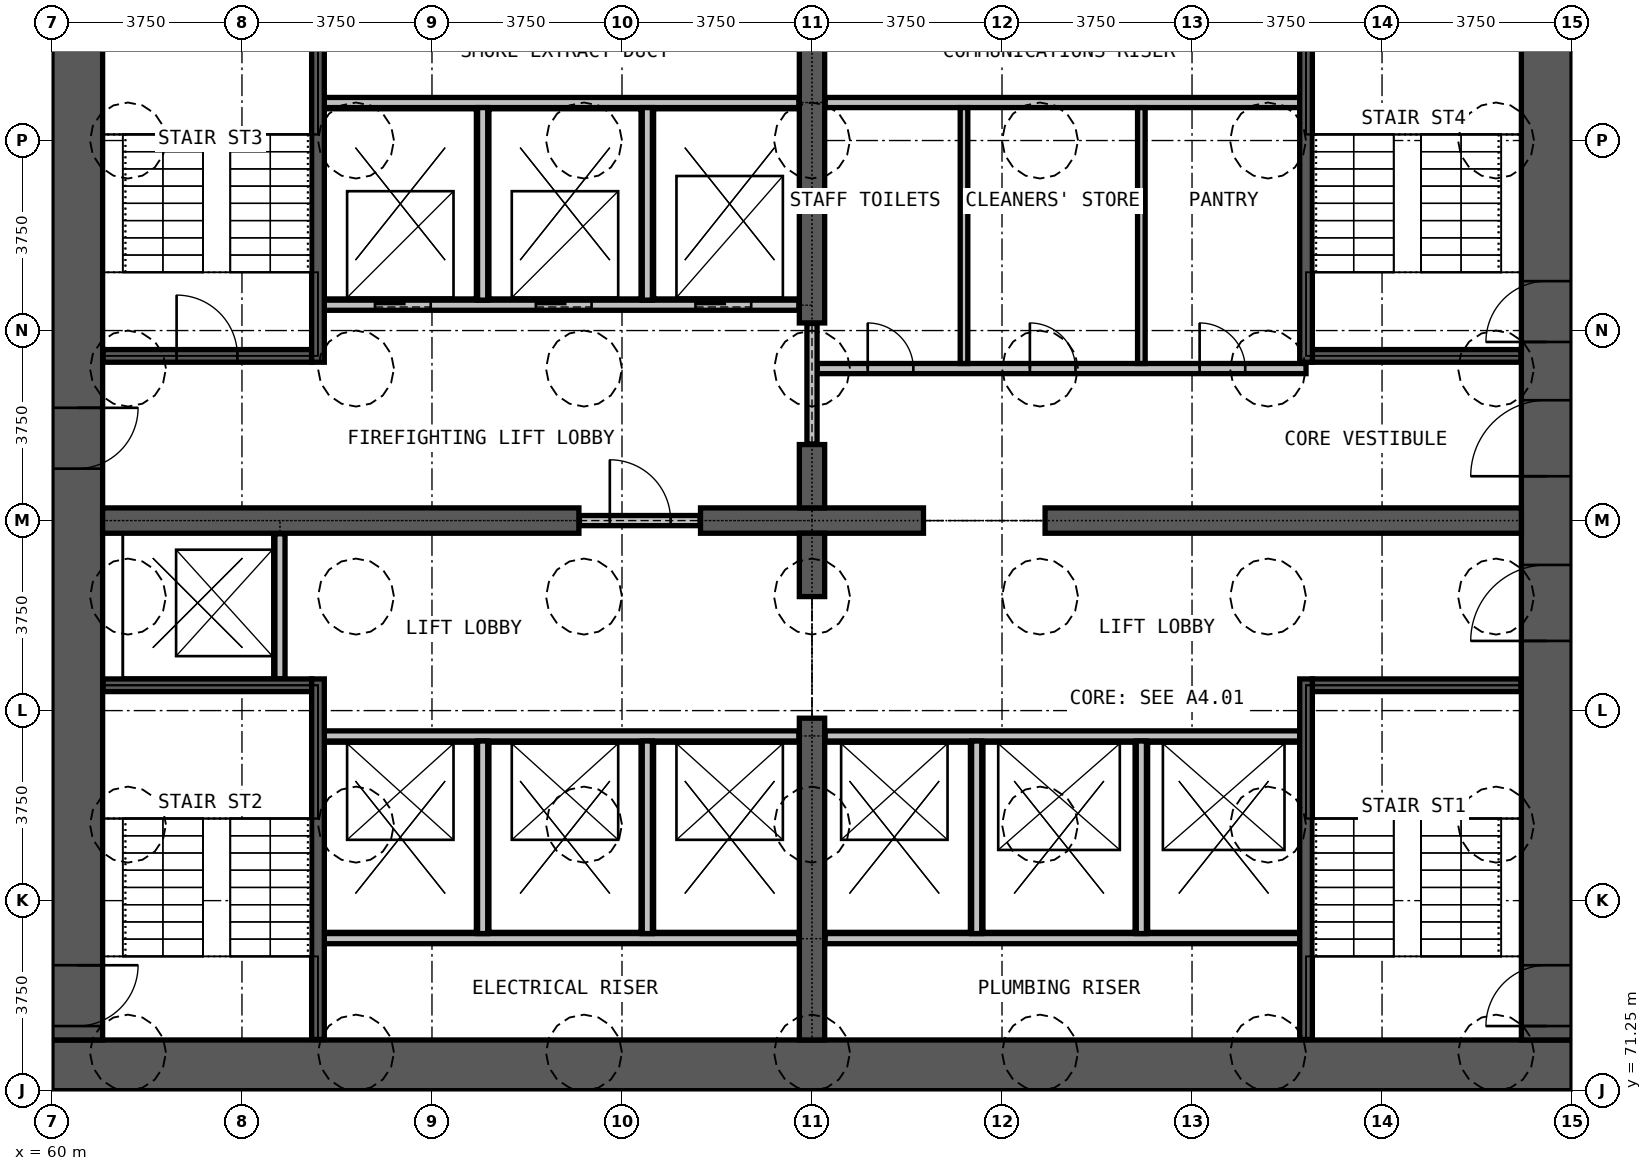
"""IFC4 building model, lengths in metres.
Left out: names, types, materials, properties, quantities, classifications, styles, units other than length and angle.
Written with IfcOpenShell. Run it as: python <this file> out.ifc"""

import sys

from ifc_helpers import new_model, si_unit, direction, frame, frame_2d, origin, place, context, subcontext, project, spatial, rectangle, extrude, element, fill, save


model = new_model("IFC4")
c1 = context("Model", 3, precision=1e-05, world=origin(), true_north=direction((0.0, 1.0)))
c2 = subcontext(c1, "Body", "Model", "MODEL_VIEW")
j1 = project(units=[si_unit("LENGTHUNIT", "METRE"), si_unit("PLANEANGLEUNIT", "RADIAN")], contexts=[c1])
p1 = place(None, origin())
s1 = spatial("IfcSite", under=j1, at=p1, CompositionType="ELEMENT")
p2 = place(p1, origin())
s2 = spatial("IfcBuilding", under=s1, at=p2, CompositionType="ELEMENT")
p3 = place(p2, frame((0.0, 0.0, -6.0)))
s3 = spatial("IfcBuildingStorey", under=s2, at=p3, CompositionType="ELEMENT", Elevation=-6.0)
p4 = place(p3, frame((60.0, 71.75, 0.0), z_axis=(0.0, 0.0, 1.0), x_axis=(1.0, 0.0, 0.0)))
e1 = element("IfcWall", 1, at=p4, inside=s3, PredefinedType="SHEAR", context=c2, shape_type="SweptSolid", body=[
    extrude(rectangle(XDim=30.0, YDim=1.0, at=frame_2d((15.0, 0.0))), origin(), (0.0, 0.0, 1.0), 6.0),
])
p5 = place(p3, frame((89.5, 72.25, 0.0), z_axis=(0.0, 0.0, 1.0), x_axis=(0.0, 1.0, 0.0)))
e2 = element("IfcWall", 2, at=p5, inside=s3, PredefinedType="SHEAR", context=c2, shape_type="SweptSolid", body=[
    extrude(rectangle(XDim=20.5, YDim=1.0, at=frame_2d((10.25, 0.0))), origin(), (0.0, 0.0, 1.0), 6.0),
])
p6 = place(p5, frame((0.275, 0.0, 0.0)))
e3 = element("IfcOpeningElement", 3, at=p6, cuts=e2, PredefinedType="OPENING", context=c2, shape_type="SweptSolid", body=[
    extrude(rectangle(XDim=1.2, YDim=2.2, at=frame_2d((0.6, 1.1))), frame((0.0, 0.51, 0.0), z_axis=(0.0, -1.0, 0.0), x_axis=(1.0, 0.0, 0.0)), (0.0, 0.0, 1.0), 1.02),
])
p7 = place(p5, frame((13.775, 0.0, 0.0)))
e4 = element("IfcOpeningElement", 4, at=p7, cuts=e2, PredefinedType="OPENING", context=c2, shape_type="SweptSolid", body=[
    extrude(rectangle(XDim=1.2, YDim=2.2, at=frame_2d((0.6, 1.1))), frame((0.0, 0.51, 0.0), z_axis=(0.0, -1.0, 0.0), x_axis=(1.0, 0.0, 0.0)), (0.0, 0.0, 1.0), 1.02),
])
p8 = place(p5, frame((7.875, 0.0, 0.0)))
e5 = element("IfcOpeningElement", 5, at=p8, cuts=e2, PredefinedType="OPENING", context=c2, shape_type="SweptSolid", body=[
    extrude(rectangle(XDim=1.5, YDim=2.2, at=frame_2d((0.75, 1.1))), frame((0.0, 0.51, 0.0), z_axis=(0.0, -1.0, 0.0), x_axis=(1.0, 0.0, 0.0)), (0.0, 0.0, 1.0), 1.02),
])
p9 = place(p5, frame((11.125, 0.0, 0.0)))
e6 = element("IfcOpeningElement", 6, at=p9, cuts=e2, PredefinedType="OPENING", context=c2, shape_type="SweptSolid", body=[
    extrude(rectangle(XDim=1.5, YDim=2.2, at=frame_2d((0.75, 1.1))), frame((0.0, 0.51, 0.0), z_axis=(0.0, -1.0, 0.0), x_axis=(1.0, 0.0, 0.0)), (0.0, 0.0, 1.0), 1.02),
])
p10 = place(p3, frame((60.5, 92.75, 0.0), z_axis=(0.0, 0.0, 1.0), x_axis=(0.0, -1.0, 0.0)))
e7 = element("IfcWall", 7, at=p10, inside=s3, PredefinedType="SHEAR", context=c2, shape_type="SweptSolid", body=[
    extrude(rectangle(XDim=20.5, YDim=1.0, at=frame_2d((10.25, 0.0))), origin(), (0.0, 0.0, 1.0), 6.0),
])
p11 = place(p10, frame((19.025, 0.0, 0.0)))
e8 = element("IfcOpeningElement", 8, at=p11, cuts=e7, PredefinedType="OPENING", context=c2, shape_type="SweptSolid", body=[
    extrude(rectangle(XDim=1.2, YDim=2.2, at=frame_2d((0.6, 1.1))), frame((0.0, 0.51, 0.0), z_axis=(0.0, -1.0, 0.0), x_axis=(1.0, 0.0, 0.0)), (0.0, 0.0, 1.0), 1.02),
])
p12 = place(p10, frame((8.025, 0.0, 0.0)))
e9 = element("IfcOpeningElement", 9, at=p12, cuts=e7, PredefinedType="OPENING", context=c2, shape_type="SweptSolid", body=[
    extrude(rectangle(XDim=1.2, YDim=2.2, at=frame_2d((0.6, 1.1))), frame((0.0, 0.51, 0.0), z_axis=(0.0, -1.0, 0.0), x_axis=(1.0, 0.0, 0.0)), (0.0, 0.0, 1.0), 1.02),
])
p13 = place(p3, frame((61.0, 82.5, 0.0), z_axis=(0.0, 0.0, 1.0), x_axis=(1.0, 0.0, 0.0)))
e10 = element("IfcWall", 10, at=p13, inside=s3, PredefinedType="SHEAR", context=c2, shape_type="SweptSolid", body=[
    extrude(rectangle(XDim=9.4, YDim=0.5, at=frame_2d((4.7, 0.0))), origin(), (0.0, 0.0, 1.0), 6.0),
])
p14 = place(p3, frame((72.8, 82.5, 0.0), z_axis=(0.0, 0.0, 1.0), x_axis=(1.0, 0.0, 0.0)))
e11 = element("IfcWall", 11, at=p14, inside=s3, PredefinedType="SHEAR", context=c2, shape_type="SweptSolid", body=[
    extrude(rectangle(XDim=4.4, YDim=0.5, at=frame_2d((2.2, 0.0))), origin(), (0.0, 0.0, 1.0), 6.0),
])
p15 = place(p3, frame((79.6, 82.5, 0.0), z_axis=(0.0, 0.0, 1.0), x_axis=(1.0, 0.0, 0.0)))
e12 = element("IfcWall", 12, at=p15, inside=s3, PredefinedType="SHEAR", context=c2, shape_type="SweptSolid", body=[
    extrude(rectangle(XDim=9.4, YDim=0.5, at=frame_2d((4.7, 0.0))), origin(), (0.0, 0.0, 1.0), 6.0),
])
p16 = place(p3, frame((75.0, 72.25, 0.0), z_axis=(0.0, 0.0, 1.0), x_axis=(0.0, 1.0, 0.0)))
e13 = element("IfcWall", 13, at=p16, inside=s3, PredefinedType="SHEAR", context=c2, shape_type="SweptSolid", body=[
    extrude(rectangle(XDim=6.35, YDim=0.5, at=frame_2d((3.175, 0.0))), origin(), (0.0, 0.0, 1.0), 6.0),
])
for number, where, z_axis, x_axis in (
    (14, (75.0, 81.0, 0.0), (0.0, 0.0, 1.0), (0.0, 1.0, 0.0)),
    (15, (75.0, 82.75, 0.0), (0.0, 0.0, 1.0), (0.0, 1.0, 0.0)),
):
    element("IfcWall", number, at=place(p3, frame(where, z_axis=z_axis, x_axis=x_axis)), inside=s3, PredefinedType="SHEAR", context=c2, shape_type="SweptSolid", body=[
        extrude(rectangle(XDim=1.25, YDim=0.5, at=frame_2d((0.625, 0.0))), origin(), (0.0, 0.0, 1.0), 6.0),
    ])
p17 = place(p3, frame((75.0, 86.4, 0.0), z_axis=(0.0, 0.0, 1.0), x_axis=(0.0, 1.0, 0.0)))
e16 = element("IfcWall", 16, at=p17, inside=s3, PredefinedType="SHEAR", context=c2, shape_type="SweptSolid", body=[
    extrude(rectangle(XDim=6.35, YDim=0.5, at=frame_2d((3.175, 0.0))), origin(), (0.0, 0.0, 1.0), 6.0),
])
p18 = place(p3, frame((70.41, 82.5, 0.0), z_axis=(0.0, 0.0, 1.0), x_axis=(1.0, 0.0, 0.0)))
e17 = element("IfcWall", 17, at=p18, inside=s3, PredefinedType="PARTITIONING", context=c2, shape_type="SweptSolid", body=[
    extrude(rectangle(XDim=2.38, YDim=0.2, at=frame_2d((1.19, 0.0))), origin(), (0.0, 0.0, 1.0), 2.4),
])
p19 = place(p18, frame((0.6, 0.0, 0.0)))
e18 = element("IfcOpeningElement", 18, at=p19, cuts=e17, PredefinedType="OPENING", context=c2, shape_type="SweptSolid", body=[
    extrude(rectangle(XDim=1.2, YDim=2.2, at=frame_2d((0.6, 1.1))), frame((0.0, 0.11, 0.0), z_axis=(0.0, -1.0, 0.0), x_axis=(1.0, 0.0, 0.0)), (0.0, 0.0, 1.0), 0.22),
])
p20 = place(p3, frame((75.1, 85.5, 0.0), z_axis=(0.0, 0.0, 1.0), x_axis=(1.0, 0.0, 0.0)))
e19 = element("IfcWall", 19, at=p20, inside=s3, PredefinedType="PARTITIONING", context=c2, shape_type="SweptSolid", body=[
    extrude(rectangle(XDim=9.65, YDim=0.2, at=frame_2d((4.825, 0.0))), origin(), (0.0, 0.0, 1.0), 5.65),
])
p21 = place(p20, frame((1.0, 0.0, 0.0)))
e20 = element("IfcOpeningElement", 20, at=p21, cuts=e19, PredefinedType="OPENING", context=c2, shape_type="SweptSolid", body=[
    extrude(rectangle(XDim=0.9, YDim=2.2, at=frame_2d((0.45, 1.1))), frame((0.0, 0.11, 0.0), z_axis=(0.0, -1.0, 0.0), x_axis=(1.0, 0.0, 0.0)), (0.0, 0.0, 1.0), 0.22),
])
p22 = place(p20, frame((4.2, 0.0, 0.0)))
e21 = element("IfcOpeningElement", 21, at=p22, cuts=e19, PredefinedType="OPENING", context=c2, shape_type="SweptSolid", body=[
    extrude(rectangle(XDim=0.9, YDim=2.2, at=frame_2d((0.45, 1.1))), frame((0.0, 0.11, 0.0), z_axis=(0.0, -1.0, 0.0), x_axis=(1.0, 0.0, 0.0)), (0.0, 0.0, 1.0), 0.22),
])
p23 = place(p20, frame((7.55, 0.0, 0.0)))
e22 = element("IfcOpeningElement", 22, at=p23, cuts=e19, PredefinedType="OPENING", context=c2, shape_type="SweptSolid", body=[
    extrude(rectangle(XDim=0.9, YDim=2.2, at=frame_2d((0.45, 1.1))), frame((0.0, 0.11, 0.0), z_axis=(0.0, -1.0, 0.0), x_axis=(1.0, 0.0, 0.0)), (0.0, 0.0, 1.0), 0.22),
])
p24 = place(p3, frame((75.26, 90.75, 0.0), z_axis=(0.0, 0.0, 1.0), x_axis=(1.0, 0.0, 0.0)))
e23 = element("IfcWall", 23, at=p24, inside=s3, PredefinedType="PARTITIONING", context=c2, shape_type="SweptSolid", body=[
    extrude(rectangle(XDim=9.365, YDim=0.2, at=frame_2d((4.683, 0.0))), origin(), (0.0, 0.0, 1.0), 5.65),
])
p25 = place(p3, frame((75.0, 84.01, 0.0), z_axis=(0.0, 0.0, 1.0), x_axis=(0.0, 1.0, 0.0)))
e24 = element("IfcWall", 24, at=p25, inside=s3, PredefinedType="PARTITIONING", context=c2, shape_type="SweptSolid", body=[
    extrude(rectangle(XDim=2.38, YDim=0.2, at=frame_2d((1.19, 0.0))), origin(), (0.0, 0.0, 1.0), 2.4),
])
for number, where, z_axis, x_axis in (
    (25, (78.0, 85.6, 0.0), (0.0, 0.0, 1.0), (0.0, 1.0, 0.0)),
    (26, (81.5, 85.6, 0.0), (0.0, 0.0, 1.0), (0.0, 1.0, 0.0)),
):
    element("IfcWall", number, at=place(p3, frame(where, z_axis=z_axis, x_axis=x_axis)), inside=s3, PredefinedType="PARTITIONING", context=c2, shape_type="SweptSolid", body=[
        extrude(rectangle(XDim=5.05, YDim=0.15, at=frame_2d((2.525, 0.0))), origin(), (0.0, 0.0, 1.0), 5.65),
    ])
for number, where, z_axis, x_axis in (
    (27, (65.375, 74.25, 0.0), (0.0, 0.0, 1.0), (1.0, 0.0, 0.0)),
    (28, (75.26, 74.25, 0.0), (0.0, 0.0, 1.0), (1.0, 0.0, 0.0)),
    (29, (65.375, 78.25, 0.0), (0.0, 0.0, 1.0), (1.0, 0.0, 0.0)),
    (30, (75.26, 78.25, 0.0), (0.0, 0.0, 1.0), (1.0, 0.0, 0.0)),
):
    element("IfcWall", number, at=place(p3, frame(where, z_axis=z_axis, x_axis=x_axis)), inside=s3, PredefinedType="PARTITIONING", context=c2, shape_type="SweptSolid", body=[
        extrude(rectangle(XDim=9.365, YDim=0.2, at=frame_2d((4.683, 0.0))), origin(), (0.0, 0.0, 1.0), 5.65),
    ])
p26 = place(p3, frame((65.375, 86.75, 0.0), z_axis=(0.0, 0.0, 1.0), x_axis=(1.0, 0.0, 0.0)))
e31 = element("IfcWall", 31, at=p26, inside=s3, PredefinedType="PARTITIONING", context=c2, shape_type="SweptSolid", body=[
    extrude(rectangle(XDim=9.365, YDim=0.2, at=frame_2d((4.683, 0.0))), origin(), (0.0, 0.0, 1.0), 5.65),
])
p27 = place(p26, frame((1.0, 0.0, 0.0)))
e32 = element("IfcOpeningElement", 32, at=p27, cuts=e31, PredefinedType="OPENING", context=c2, shape_type="SweptSolid", body=[
    extrude(rectangle(XDim=1.1, YDim=2.2, at=frame_2d((0.55, 1.1))), frame((0.0, 0.11, 0.0), z_axis=(0.0, -1.0, 0.0), x_axis=(1.0, 0.0, 0.0)), (0.0, 0.0, 1.0), 0.22),
])
p28 = place(p26, frame((4.175, 0.0, 0.0)))
e33 = element("IfcOpeningElement", 33, at=p28, cuts=e31, PredefinedType="OPENING", context=c2, shape_type="SweptSolid", body=[
    extrude(rectangle(XDim=1.1, YDim=2.2, at=frame_2d((0.55, 1.1))), frame((0.0, 0.11, 0.0), z_axis=(0.0, -1.0, 0.0), x_axis=(1.0, 0.0, 0.0)), (0.0, 0.0, 1.0), 0.22),
])
p29 = place(p26, frame((7.325, 0.0, 0.0)))
e34 = element("IfcOpeningElement", 34, at=p29, cuts=e31, PredefinedType="OPENING", context=c2, shape_type="SweptSolid", body=[
    extrude(rectangle(XDim=1.1, YDim=2.2, at=frame_2d((0.55, 1.1))), frame((0.0, 0.11, 0.0), z_axis=(0.0, -1.0, 0.0), x_axis=(1.0, 0.0, 0.0)), (0.0, 0.0, 1.0), 0.22),
])
p30 = place(p3, frame((65.375, 90.75, 0.0), z_axis=(0.0, 0.0, 1.0), x_axis=(1.0, 0.0, 0.0)))
e35 = element("IfcWall", 35, at=p30, inside=s3, PredefinedType="PARTITIONING", context=c2, shape_type="SweptSolid", body=[
    extrude(rectangle(XDim=9.365, YDim=0.2, at=frame_2d((4.683, 0.0))), origin(), (0.0, 0.0, 1.0), 5.65),
])
p31 = place(p3, frame((64.5, 79.375, 0.0), z_axis=(0.0, 0.0, 1.0), x_axis=(0.0, 1.0, 0.0)))
e36 = element("IfcWall", 36, at=p31, inside=s3, PredefinedType="PARTITIONING", context=c2, shape_type="SweptSolid", body=[
    extrude(rectangle(XDim=2.865, YDim=0.2, at=frame_2d((1.433, 0.0))), origin(), (0.0, 0.0, 1.0), 5.65),
])
for number, where, z_axis, x_axis in (
    (37, (68.5, 74.35, 0.0), (0.0, 0.0, 1.0), (0.0, 1.0, 0.0)),
    (38, (68.5, 86.85, 0.0), (0.0, 0.0, 1.0), (0.0, 1.0, 0.0)),
    (39, (71.75, 74.35, 0.0), (0.0, 0.0, 1.0), (0.0, 1.0, 0.0)),
    (40, (71.75, 86.85, 0.0), (0.0, 0.0, 1.0), (0.0, 1.0, 0.0)),
    (41, (78.25, 74.35, 0.0), (0.0, 0.0, 1.0), (0.0, 1.0, 0.0)),
    (42, (81.5, 74.35, 0.0), (0.0, 0.0, 1.0), (0.0, 1.0, 0.0)),
):
    element("IfcWall", number, at=place(p3, frame(where, z_axis=z_axis, x_axis=x_axis)), inside=s3, PredefinedType="PARTITIONING", context=c2, shape_type="SweptSolid", body=[
        extrude(rectangle(XDim=3.8, YDim=0.2, at=frame_2d((1.9, 0.0))), origin(), (0.0, 0.0, 1.0), 5.65),
    ])
for number, where, z_axis, x_axis in (
    (43, (61.01, 79.25, 0.0), (0.0, 0.0, 1.0), (1.0, 0.0, 0.0)),
    (44, (84.875, 79.25, 0.0), (0.0, 0.0, 1.0), (1.0, 0.0, 0.0)),
):
    element("IfcWall", number, at=place(p3, frame(where, z_axis=z_axis, x_axis=x_axis)), inside=s3, PredefinedType="PARTITIONING", context=c2, shape_type="SweptSolid", body=[
        extrude(rectangle(XDim=4.115, YDim=0.25, at=frame_2d((2.058, 0.0))), origin(), (0.0, 0.0, 1.0), 5.65),
    ])
p32 = place(p3, frame((61.01, 85.75, 0.0), z_axis=(0.0, 0.0, 1.0), x_axis=(1.0, 0.0, 0.0)))
e45 = element("IfcWall", 45, at=p32, inside=s3, PredefinedType="PARTITIONING", context=c2, shape_type="SweptSolid", body=[
    extrude(rectangle(XDim=4.115, YDim=0.25, at=frame_2d((2.058, 0.0))), origin(), (0.0, 0.0, 1.0), 5.65),
])
p33 = place(p32, frame((1.45, 0.0, 0.0)))
e46 = element("IfcOpeningElement", 46, at=p33, cuts=e45, PredefinedType="OPENING", context=c2, shape_type="SweptSolid", body=[
    extrude(rectangle(XDim=1.2, YDim=2.2, at=frame_2d((0.6, 1.1))), frame((0.0, 0.135, 0.0), z_axis=(0.0, -1.0, 0.0), x_axis=(1.0, 0.0, 0.0)), (0.0, 0.0, 1.0), 0.27),
])
p34 = place(p3, frame((84.875, 85.75, 0.0), z_axis=(0.0, 0.0, 1.0), x_axis=(1.0, 0.0, 0.0)))
e47 = element("IfcWall", 47, at=p34, inside=s3, PredefinedType="PARTITIONING", context=c2, shape_type="SweptSolid", body=[
    extrude(rectangle(XDim=4.115, YDim=0.25, at=frame_2d((2.058, 0.0))), origin(), (0.0, 0.0, 1.0), 5.65),
])
for number, where, z_axis, x_axis in (
    (48, (65.25, 72.26, 0.0), (0.0, 0.0, 1.0), (0.0, 1.0, 0.0)),
    (49, (65.25, 85.625, 0.0), (0.0, 0.0, 1.0), (0.0, 1.0, 0.0)),
    (50, (84.75, 72.26, 0.0), (0.0, 0.0, 1.0), (0.0, 1.0, 0.0)),
    (51, (84.75, 85.625, 0.0), (0.0, 0.0, 1.0), (0.0, 1.0, 0.0)),
):
    element("IfcWall", number, at=place(p3, frame(where, z_axis=z_axis, x_axis=x_axis)), inside=s3, PredefinedType="PARTITIONING", context=c2, shape_type="SweptSolid", body=[
        extrude(rectangle(XDim=7.115, YDim=0.25, at=frame_2d((3.558, 0.0))), origin(), (0.0, 0.0, 1.0), 5.65),
    ])
p35 = place(p27, origin())
e52 = element("IfcDoor", 52, at=p35, inside=s3, OperationType="DOUBLE_DOOR_SLIDING", PredefinedType="DOOR", context=c2, shape_type="SweptSolid", body=[
    extrude(rectangle(XDim=1.1, YDim=2.2, at=frame_2d((0.55, 1.1))), frame((0.0, 0.025, 0.0), z_axis=(0.0, -1.0, 0.0), x_axis=(1.0, 0.0, 0.0)), (0.0, 0.0, 1.0), 0.05),
])
fill(e32, e52)
p36 = place(p28, origin())
e53 = element("IfcDoor", 53, at=p36, inside=s3, OperationType="DOUBLE_DOOR_SLIDING", PredefinedType="DOOR", context=c2, shape_type="SweptSolid", body=[
    extrude(rectangle(XDim=1.1, YDim=2.2, at=frame_2d((0.55, 1.1))), frame((0.0, 0.025, 0.0), z_axis=(0.0, -1.0, 0.0), x_axis=(1.0, 0.0, 0.0)), (0.0, 0.0, 1.0), 0.05),
])
fill(e33, e53)
p37 = place(p29, origin())
e54 = element("IfcDoor", 54, at=p37, inside=s3, OperationType="DOUBLE_DOOR_SLIDING", PredefinedType="DOOR", context=c2, shape_type="SweptSolid", body=[
    extrude(rectangle(XDim=1.1, YDim=2.2, at=frame_2d((0.55, 1.1))), frame((0.0, 0.025, 0.0), z_axis=(0.0, -1.0, 0.0), x_axis=(1.0, 0.0, 0.0)), (0.0, 0.0, 1.0), 0.05),
])
fill(e34, e54)
p38 = place(p19, origin())
e55 = element("IfcDoor", 55, at=p38, inside=s3, OperationType="SINGLE_SWING_LEFT", PredefinedType="DOOR", context=c2, shape_type="SweptSolid", body=[
    extrude(rectangle(XDim=1.2, YDim=2.2, at=frame_2d((0.6, 1.1))), frame((0.0, 0.025, 0.0), z_axis=(0.0, -1.0, 0.0), x_axis=(1.0, 0.0, 0.0)), (0.0, 0.0, 1.0), 0.05),
])
fill(e18, e55)
p39 = place(p33, origin())
e56 = element("IfcDoor", 56, at=p39, inside=s3, OperationType="SINGLE_SWING_RIGHT", PredefinedType="DOOR", context=c2, shape_type="SweptSolid", body=[
    extrude(rectangle(XDim=1.2, YDim=2.2, at=frame_2d((0.6, 1.1))), frame((0.0, 0.025, 0.0), z_axis=(0.0, -1.0, 0.0), x_axis=(1.0, 0.0, 0.0)), (0.0, 0.0, 1.0), 0.05),
])
fill(e46, e56)
p40 = place(p6, origin())
e57 = element("IfcDoor", 57, at=p40, inside=s3, OperationType="SINGLE_SWING_RIGHT", PredefinedType="DOOR", context=c2, shape_type="SweptSolid", body=[
    extrude(rectangle(XDim=1.2, YDim=2.2, at=frame_2d((0.6, 1.1))), frame((0.0, 0.025, 0.0), z_axis=(0.0, -1.0, 0.0), x_axis=(1.0, 0.0, 0.0)), (0.0, 0.0, 1.0), 0.05),
])
fill(e3, e57)
p41 = place(p11, origin())
e58 = element("IfcDoor", 58, at=p41, inside=s3, OperationType="SINGLE_SWING_RIGHT", PredefinedType="DOOR", context=c2, shape_type="SweptSolid", body=[
    extrude(rectangle(XDim=1.2, YDim=2.2, at=frame_2d((0.6, 1.1))), frame((0.0, 0.025, 0.0), z_axis=(0.0, -1.0, 0.0), x_axis=(1.0, 0.0, 0.0)), (0.0, 0.0, 1.0), 0.05),
])
fill(e8, e58)
p42 = place(p7, origin())
e59 = element("IfcDoor", 59, at=p42, inside=s3, OperationType="SINGLE_SWING_LEFT", PredefinedType="DOOR", context=c2, shape_type="SweptSolid", body=[
    extrude(rectangle(XDim=1.2, YDim=2.2, at=frame_2d((0.6, 1.1))), frame((0.0, 0.025, 0.0), z_axis=(0.0, -1.0, 0.0), x_axis=(1.0, 0.0, 0.0)), (0.0, 0.0, 1.0), 0.05),
])
fill(e4, e59)
p43 = place(p8, origin())
e60 = element("IfcDoor", 60, at=p43, inside=s3, OperationType="DOUBLE_DOOR_SINGLE_SWING", PredefinedType="DOOR", context=c2, shape_type="SweptSolid", body=[
    extrude(rectangle(XDim=1.5, YDim=2.2, at=frame_2d((0.75, 1.1))), frame((0.0, 0.025, 0.0), z_axis=(0.0, -1.0, 0.0), x_axis=(1.0, 0.0, 0.0)), (0.0, 0.0, 1.0), 0.05),
])
fill(e5, e60)
p44 = place(p12, origin())
e61 = element("IfcDoor", 61, at=p44, inside=s3, OperationType="SINGLE_SWING_LEFT", PredefinedType="DOOR", context=c2, shape_type="SweptSolid", body=[
    extrude(rectangle(XDim=1.2, YDim=2.2, at=frame_2d((0.6, 1.1))), frame((0.0, 0.025, 0.0), z_axis=(0.0, -1.0, 0.0), x_axis=(1.0, 0.0, 0.0)), (0.0, 0.0, 1.0), 0.05),
])
fill(e9, e61)
p45 = place(p9, origin())
e62 = element("IfcDoor", 62, at=p45, inside=s3, OperationType="DOUBLE_DOOR_SINGLE_SWING", PredefinedType="DOOR", context=c2, shape_type="SweptSolid", body=[
    extrude(rectangle(XDim=1.5, YDim=2.2, at=frame_2d((0.75, 1.1))), frame((0.0, 0.025, 0.0), z_axis=(0.0, -1.0, 0.0), x_axis=(1.0, 0.0, 0.0)), (0.0, 0.0, 1.0), 0.05),
])
fill(e6, e62)
p46 = place(p21, origin())
e63 = element("IfcDoor", 63, at=p46, inside=s3, OperationType="SINGLE_SWING_LEFT", PredefinedType="DOOR", context=c2, shape_type="SweptSolid", body=[
    extrude(rectangle(XDim=0.9, YDim=2.2, at=frame_2d((0.45, 1.1))), frame((0.0, 0.025, 0.0), z_axis=(0.0, -1.0, 0.0), x_axis=(1.0, 0.0, 0.0)), (0.0, 0.0, 1.0), 0.05),
])
fill(e20, e63)
p47 = place(p22, origin())
e64 = element("IfcDoor", 64, at=p47, inside=s3, OperationType="SINGLE_SWING_LEFT", PredefinedType="DOOR", context=c2, shape_type="SweptSolid", body=[
    extrude(rectangle(XDim=0.9, YDim=2.2, at=frame_2d((0.45, 1.1))), frame((0.0, 0.025, 0.0), z_axis=(0.0, -1.0, 0.0), x_axis=(1.0, 0.0, 0.0)), (0.0, 0.0, 1.0), 0.05),
])
fill(e21, e64)
p48 = place(p23, origin())
e65 = element("IfcDoor", 65, at=p48, inside=s3, OperationType="SINGLE_SWING_LEFT", PredefinedType="DOOR", context=c2, shape_type="SweptSolid", body=[
    extrude(rectangle(XDim=0.9, YDim=2.2, at=frame_2d((0.45, 1.1))), frame((0.0, 0.025, 0.0), z_axis=(0.0, -1.0, 0.0), x_axis=(1.0, 0.0, 0.0)), (0.0, 0.0, 1.0), 0.05),
])
fill(e22, e65)
save(model, sys.argv[1])
